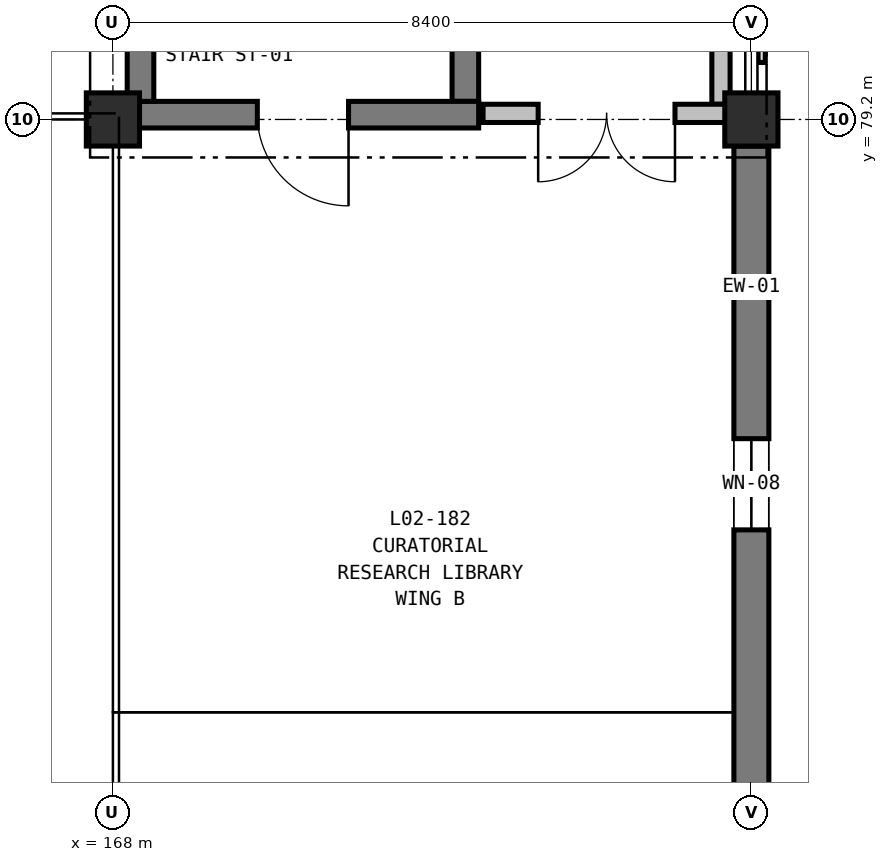
"""IFC4 building model, lengths in metres.
Left out: names, types, materials, properties, quantities, classifications, styles, units other than length and angle.
Written with IfcOpenShell. Run it as: python <this file> out.ifc"""

import sys

from ifc_helpers import new_model, si_unit, direction, frame, frame_2d, origin, origin_2d, place, context, subcontext, project, spatial, rectangle, extrude, element, fill, save


model = new_model("IFC4")
c1 = context("Model", 3, precision=1e-05, world=origin(), true_north=direction((0.0, 1.0)))
c2 = subcontext(c1, "Body", "Model", "MODEL_VIEW")
j1 = project(units=[si_unit("LENGTHUNIT", "METRE"), si_unit("PLANEANGLEUNIT", "RADIAN")], contexts=[c1])
p1 = place(None, origin())
s1 = spatial("IfcSite", under=j1, at=p1, CompositionType="ELEMENT")
p2 = place(p1, origin())
s2 = spatial("IfcBuilding", under=s1, at=p2, CompositionType="ELEMENT")
p3 = place(p2, frame((0.0, 0.0, 11.4)))
s3 = spatial("IfcBuildingStorey", under=s2, at=p3, CompositionType="ELEMENT", Elevation=11.4)
for number, where, z_axis, x_axis in (
    (1, (168.0, 79.2, 0.0), (0.0, 0.0, 1.0), (1.0, 0.0, 0.0)),
    (2, (176.4, 79.2, 0.0), (0.0, 0.0, 1.0), (1.0, 0.0, 0.0)),
):
    element("IfcColumn", number, at=place(p3, frame(where, z_axis=z_axis, x_axis=x_axis)), inside=s3, PredefinedType="COLUMN", context=c2, shape_type="SweptSolid", body=[
        extrude(rectangle(XDim=0.7, YDim=0.7, at=origin_2d()), origin(), (0.0, 0.0, 1.0), 5.4),
    ])
p4 = place(p3, frame((176.4, 78.85, 0.0), z_axis=(0.0, 0.0, 1.0), x_axis=(0.0, -1.0, 0.0)))
e3 = element("IfcWall", 3, at=p4, inside=s3, PredefinedType="SOLIDWALL", context=c2, shape_type="SweptSolid", body=[
    extrude(rectangle(XDim=8.9, YDim=0.46, at=frame_2d((4.45, 0.0))), origin(), (0.0, 0.0, 1.0), 5.1),
])
p5 = place(p4, frame((3.85, 0.0, 0.9)))
e4 = element("IfcOpeningElement", 4, at=p5, cuts=e3, PredefinedType="OPENING", context=c2, shape_type="SweptSolid", body=[
    extrude(rectangle(XDim=1.2, YDim=2.1, at=frame_2d((0.6, 1.05))), frame((0.0, 0.24, 0.0), z_axis=(0.0, -1.0, 0.0), x_axis=(1.0, 0.0, 0.0)), (0.0, 0.0, 1.0), 0.48),
])
p6 = place(p3, frame((172.637, 88.562, 0.0), z_axis=(0.0, 0.0, 1.0), x_axis=(0.0, -1.0, 0.0)))
e5 = element("IfcWall", 5, at=p6, inside=s3, PredefinedType="SHEAR", context=c2, shape_type="SweptSolid", body=[
    extrude(rectangle(XDim=9.124, YDim=0.35, at=frame_2d((4.562, 0.0))), origin(), (0.0, 0.0, 1.0), 5.1),
])
p7 = place(p3, frame((172.812, 79.263, 0.0), z_axis=(0.0, 0.0, 1.0), x_axis=(-1.0, 0.0, 0.0)))
e6 = element("IfcWall", 6, at=p7, inside=s3, PredefinedType="SHEAR", context=c2, shape_type="SweptSolid", body=[
    extrude(rectangle(XDim=4.624, YDim=0.35, at=frame_2d((2.312, 0.0))), origin(), (0.0, 0.0, 1.0), 5.1),
])
p8 = place(p7, frame((1.712, 0.0, 0.0)))
e7 = element("IfcOpeningElement", 7, at=p8, cuts=e6, PredefinedType="OPENING", context=c2, shape_type="SweptSolid", body=[
    extrude(rectangle(XDim=1.2, YDim=2.2, at=frame_2d((0.6, 1.1))), frame((0.0, 0.185, 0.0), z_axis=(0.0, -1.0, 0.0), x_axis=(1.0, 0.0, 0.0)), (0.0, 0.0, 1.0), 0.37),
])
p9 = place(p3, frame((168.363, 79.438, 0.0), z_axis=(0.0, 0.0, 1.0), x_axis=(0.0, 1.0, 0.0)))
e8 = element("IfcWall", 8, at=p9, inside=s3, PredefinedType="SHEAR", context=c2, shape_type="SweptSolid", body=[
    extrude(rectangle(XDim=9.124, YDim=0.35, at=frame_2d((4.562, 0.0))), origin(), (0.0, 0.0, 1.0), 5.1),
])
p10 = place(p3, frame((176.0, 84.9, 0.0), z_axis=(0.0, 0.0, 1.0), x_axis=(0.0, -1.0, 0.0)))
e9 = element("IfcWall", 9, at=p10, inside=s3, PredefinedType="PARTITIONING", context=c2, shape_type="SweptSolid", body=[
    extrude(rectangle(XDim=5.5, YDim=0.24, at=frame_2d((2.75, 0.0))), origin(), (0.0, 0.0, 1.0), 4.425),
])
p11 = place(p3, frame((176.12, 79.28, 0.0), z_axis=(0.0, 0.0, 1.0), x_axis=(-1.0, 0.0, 0.0)))
e10 = element("IfcWall", 10, at=p11, inside=s3, PredefinedType="PARTITIONING", context=c2, shape_type="SweptSolid", body=[
    extrude(rectangle(XDim=3.25, YDim=0.24, at=frame_2d((1.625, 0.0))), origin(), (0.0, 0.0, 1.0), 4.425),
])
p12 = place(p11, frame((0.725, 0.0, 0.0)))
e11 = element("IfcOpeningElement", 11, at=p12, cuts=e10, PredefinedType="OPENING", context=c2, shape_type="SweptSolid", body=[
    extrude(rectangle(XDim=1.8, YDim=2.25, at=frame_2d((0.9, 1.125))), frame((0.0, 0.13, 0.0), z_axis=(0.0, -1.0, 0.0), x_axis=(1.0, 0.0, 0.0)), (0.0, 0.0, 1.0), 0.26),
])
p13 = place(p5, origin())
e12 = element("IfcWindow", 12, at=p13, inside=s3, PartitioningType="SINGLE_PANEL", PredefinedType="WINDOW", context=c2, shape_type="SweptSolid", body=[
    extrude(rectangle(XDim=1.2, YDim=2.1, at=frame_2d((0.6, 1.05))), frame((0.0, 0.03, 0.0), z_axis=(0.0, -1.0, 0.0), x_axis=(1.0, 0.0, 0.0)), (0.0, 0.0, 1.0), 0.06),
])
fill(e4, e12)
p14 = place(p8, origin())
e13 = element("IfcDoor", 13, at=p14, inside=s3, OperationType="SINGLE_SWING_LEFT", PredefinedType="DOOR", context=c2, shape_type="SweptSolid", body=[
    extrude(rectangle(XDim=1.2, YDim=2.2, at=frame_2d((0.6, 1.1))), frame((0.0, 0.025, 0.0), z_axis=(0.0, -1.0, 0.0), x_axis=(1.0, 0.0, 0.0)), (0.0, 0.0, 1.0), 0.05),
])
fill(e7, e13)
p15 = place(p12, origin())
e14 = element("IfcDoor", 14, at=p15, inside=s3, OperationType="DOUBLE_DOOR_SINGLE_SWING", PredefinedType="DOOR", context=c2, shape_type="SweptSolid", body=[
    extrude(rectangle(XDim=1.8, YDim=2.25, at=frame_2d((0.9, 1.125))), frame((0.0, 0.025, 0.0), z_axis=(0.0, -1.0, 0.0), x_axis=(1.0, 0.0, 0.0)), (0.0, 0.0, 1.0), 0.05),
])
fill(e11, e14)
save(model, sys.argv[1])
